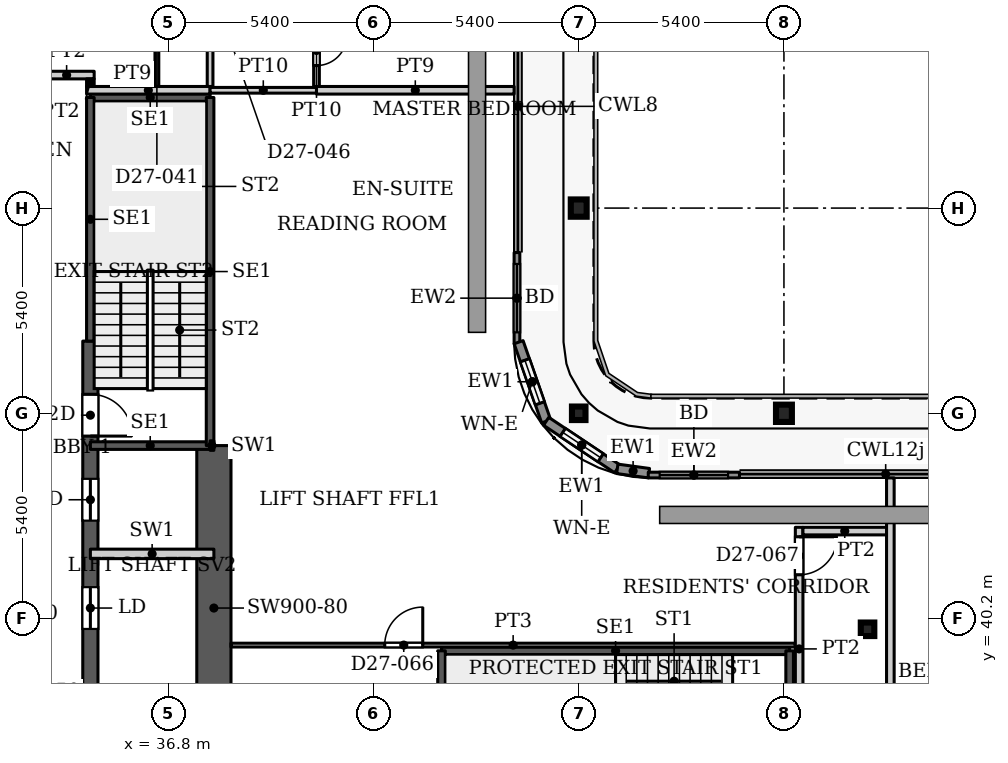
"""IFC4 building model, lengths in metres.
Left out: names, types, materials, properties, quantities, classifications, styles, units other than length and angle.
Written with IfcOpenShell. Run it as: python <this file> out.ifc"""

import sys

from ifc_helpers import new_model, si_unit, direction, frame, frame_2d, origin, origin_2d, place, context, subcontext, project, spatial, rectangle, hollow_rectangle, i_section, extrude, source, transform, mapped, element, fill, save


model = new_model("IFC4")
c1 = context("Model", 3, precision=1e-05, world=origin(), true_north=direction((0.0, 1.0)))
c2 = subcontext(c1, "Body", "Model", "MODEL_VIEW")
j1 = project(units=[si_unit("LENGTHUNIT", "METRE"), si_unit("PLANEANGLEUNIT", "RADIAN")], contexts=[c1])
p1 = place(None, origin())
s1 = spatial("IfcSite", under=j1, at=p1, CompositionType="ELEMENT")
p2 = place(p1, origin())
s2 = spatial("IfcBuilding", under=s1, at=p2, CompositionType="ELEMENT")
p3 = place(p2, frame((0.0, 0.0, 121.4)))
s3 = spatial("IfcBuildingStorey", under=s2, at=p3, CompositionType="ELEMENT", Elevation=121.4)
for number, where, z_axis, x_axis in (
    (1, (53.0, 45.6, 0.0), (0.0, 0.0, 1.0), (1.0, 0.0, 0.0)),
    (2, (47.6, 51.0, 0.0), (0.0, 0.0, 1.0), (1.0, 0.0, 0.0)),
):
    element("IfcColumn", number, at=place(p3, frame(where, z_axis=z_axis, x_axis=x_axis)), inside=s3, PredefinedType="COLUMN", context=c2, shape_type="SweptSolid", body=[
        extrude(i_section(OverallWidth=0.418, OverallDepth=0.455, WebThickness=0.042, FlangeThickness=0.068, FilletRadius=0.014, at=origin_2d()), origin(), (0.0, 0.0, 1.0), 3.9),
    ])
for number, where, z_axis, x_axis in (
    (3, (55.2, 39.916, 0.0), (0.0, 0.0, 1.0), (1.0, 0.0, 0.0)),
    (4, (47.6, 45.6, 0.0), (0.0, 0.0, 1.0), (1.0, 0.0, 0.0)),
):
    element("IfcColumn", number, at=place(p3, frame(where, z_axis=z_axis, x_axis=x_axis)), inside=s3, PredefinedType="COLUMN", context=c2, shape_type="SweptSolid", body=[
        extrude(hollow_rectangle(XDim=0.356, YDim=0.356, WallThickness=0.016, InnerFilletRadius=0.016, OuterFilletRadius=0.032, at=origin_2d()), origin(), (0.0, 0.0, 1.0), 3.9),
    ])
p4 = place(p3, frame((34.75, 29.05, 0.0), z_axis=(0.0, 0.0, 1.0), x_axis=(0.0, 1.0, 0.0)))
e5 = element("IfcWall", 5, at=p4, inside=s3, PredefinedType="SHEAR", context=c2, shape_type="SweptSolid", body=[
    extrude(rectangle(XDim=18.45, YDim=0.4, at=frame_2d((9.225, 0.0))), origin(), (0.0, 0.0, 1.0), 3.9),
])
p5 = place(p4, frame((8.025, 0.0, 0.0)))
e6 = element("IfcOpeningElement", 6, at=p5, cuts=e5, PredefinedType="OPENING", context=c2, shape_type="SweptSolid", body=[
    extrude(rectangle(XDim=1.1, YDim=2.2, at=frame_2d((0.55, 1.1))), frame((0.0, 0.21, 0.0), z_axis=(0.0, -1.0, 0.0), x_axis=(1.0, 0.0, 0.0)), (0.0, 0.0, 1.0), 0.42),
])
p6 = place(p4, frame((10.875, 0.0, 0.0)))
e7 = element("IfcOpeningElement", 7, at=p6, cuts=e5, PredefinedType="OPENING", context=c2, shape_type="SweptSolid", body=[
    extrude(rectangle(XDim=1.1, YDim=2.2, at=frame_2d((0.55, 1.1))), frame((0.0, 0.21, 0.0), z_axis=(0.0, -1.0, 0.0), x_axis=(1.0, 0.0, 0.0)), (0.0, 0.0, 1.0), 0.42),
])
p7 = place(p4, frame((13.725, 0.0, 0.0)))
e8 = element("IfcOpeningElement", 8, at=p7, cuts=e5, PredefinedType="OPENING", context=c2, shape_type="SweptSolid", body=[
    extrude(rectangle(XDim=1.1, YDim=2.2, at=frame_2d((0.55, 1.1))), frame((0.0, 0.21, 0.0), z_axis=(0.0, -1.0, 0.0), x_axis=(1.0, 0.0, 0.0)), (0.0, 0.0, 1.0), 0.42),
])
p8 = place(p4, frame((15.95, 0.0, 0.0)))
e9 = element("IfcOpeningElement", 9, at=p8, cuts=e5, PredefinedType="OPENING", context=c2, shape_type="SweptSolid", body=[
    extrude(rectangle(XDim=1.1, YDim=2.2, at=frame_2d((0.55, 1.1))), frame((0.0, 0.21, 0.0), z_axis=(0.0, -1.0, 0.0), x_axis=(1.0, 0.0, 0.0)), (0.0, 0.0, 1.0), 0.42),
])
p9 = place(p3, frame((38.0, 36.2, 0.0), z_axis=(0.0, 0.0, 1.0), x_axis=(0.0, 1.0, 0.0)))
e10 = element("IfcWall", 10, at=p9, inside=s3, PredefinedType="SHEAR", context=c2, shape_type="SweptSolid", body=[
    extrude(rectangle(XDim=8.55, YDim=0.9, at=frame_2d((4.275, 0.0))), origin(), (0.0, 0.0, 1.0), 3.9),
])
p10 = place(p3, frame((45.975, 49.83, 0.0), z_axis=(0.0, 0.0, 1.0), x_axis=(0.0, -1.0, 0.0)))
e11 = element("IfcWall", 11, at=p10, inside=s3, PredefinedType="SOLIDWALL", context=c2, shape_type="SweptSolid", body=[
    extrude(rectangle(XDim=2.4, YDim=0.15, at=frame_2d((1.2, 0.0))), origin(), (0.0, 0.0, 1.0), 3.75),
])
p11 = place(p10, frame((0.3, 0.0, 0.0)))
e12 = element("IfcOpeningElement", 12, at=p11, cuts=e11, PredefinedType="OPENING", context=c2, shape_type="SweptSolid", body=[
    extrude(rectangle(XDim=1.8, YDim=2.4, at=frame_2d((0.9, 1.2))), frame((0.0, 0.085, 0.0), z_axis=(0.0, -1.0, 0.0), x_axis=(1.0, 0.0, 0.0)), (0.0, 0.0, 1.0), 0.17),
])
p12 = place(p3, frame((46.018, 47.471, 0.0), z_axis=(0.0, 0.0, 1.0), x_axis=(0.328791208903, -0.944402637093, 0.0)))
e13 = element("IfcWall", 13, at=p12, inside=s3, PredefinedType="SOLIDWALL", context=c2, shape_type="SweptSolid", body=[
    extrude(rectangle(XDim=2.205, YDim=0.25, at=frame_2d((1.102, 0.0))), origin(), (0.0, 0.0, 1.0), 3.75),
])
p13 = place(p12, frame((0.503, 0.0, 0.6)))
e14 = element("IfcOpeningElement", 14, at=p13, cuts=e13, PredefinedType="OPENING", context=c2, shape_type="SweptSolid", body=[
    extrude(rectangle(XDim=1.2, YDim=2.1, at=frame_2d((0.6, 1.05))), frame((0.0, 0.135, 0.0), z_axis=(0.0, -1.0, 0.0), x_axis=(1.0, 0.0, 0.0)), (0.0, 0.0, 1.0), 0.27),
])
p14 = place(p3, frame((46.743, 45.389, 0.0), z_axis=(0.0, 0.0, 1.0), x_axis=(0.831449265529, -0.555600682912, 0.0)))
e15 = element("IfcWall", 15, at=p14, inside=s3, PredefinedType="SOLIDWALL", context=c2, shape_type="SweptSolid", body=[
    extrude(rectangle(XDim=2.251, YDim=0.25, at=frame_2d((1.126, 0.0))), origin(), (0.0, 0.0, 1.0), 3.75),
])
p15 = place(p14, frame((0.525, 0.0, 0.6)))
e16 = element("IfcOpeningElement", 16, at=p15, cuts=e15, PredefinedType="OPENING", context=c2, shape_type="SweptSolid", body=[
    extrude(rectangle(XDim=1.2, YDim=2.1, at=frame_2d((0.6, 1.05))), frame((0.0, 0.135, 0.0), z_axis=(0.0, -1.0, 0.0), x_axis=(1.0, 0.0, 0.0)), (0.0, 0.0, 1.0), 0.27),
])
p16 = place(p3, frame((48.615, 44.138, 0.0), z_axis=(0.0, 0.0, 1.0), x_axis=(0.990741504246, -0.135761819977, 0.0)))
e17 = element("IfcWall", 17, at=p16, inside=s3, PredefinedType="SOLIDWALL", context=c2, shape_type="SweptSolid", body=[
    extrude(rectangle(XDim=0.84, YDim=0.25, at=frame_2d((0.42, 0.0))), origin(), (0.0, 0.0, 1.0), 3.75),
])
p17 = place(p3, frame((49.43, 43.975, 0.0), z_axis=(0.0, 0.0, 1.0), x_axis=(1.0, 0.0, 0.0)))
e18 = element("IfcWall", 18, at=p17, inside=s3, PredefinedType="SOLIDWALL", context=c2, shape_type="SweptSolid", body=[
    extrude(rectangle(XDim=2.4, YDim=0.15, at=frame_2d((1.2, 0.0))), origin(), (0.0, 0.0, 1.0), 3.75),
])
p18 = place(p17, frame((0.3, 0.0, 0.0)))
e19 = element("IfcOpeningElement", 19, at=p18, cuts=e18, PredefinedType="OPENING", context=c2, shape_type="SweptSolid", body=[
    extrude(rectangle(XDim=1.8, YDim=2.4, at=frame_2d((0.9, 1.2))), frame((0.0, 0.085, 0.0), z_axis=(0.0, -1.0, 0.0), x_axis=(1.0, 0.0, 0.0)), (0.0, 0.0, 1.0), 0.17),
])
p19 = place(p3, frame((43.99, 39.35, 0.0), z_axis=(0.0, 0.0, 1.0), x_axis=(1.0, 0.0, 0.0)))
e20 = element("IfcWall", 20, at=p19, inside=s3, PredefinedType="SHEAR", context=c2, shape_type="SweptSolid", body=[
    extrude(rectangle(XDim=9.16, YDim=0.2, at=frame_2d((4.58, 0.0))), origin(), (0.0, 0.0, 1.0), 3.9),
])
for number, where, z_axis, x_axis in (
    (21, (43.99, 36.2, 0.0), (0.0, 0.0, 1.0), (0.0, 1.0, 0.0)),
    (22, (53.15, 36.2, 0.0), (0.0, 0.0, 1.0), (0.0, 1.0, 0.0)),
):
    element("IfcWall", number, at=place(p3, frame(where, z_axis=z_axis, x_axis=x_axis)), inside=s3, PredefinedType="SHEAR", context=c2, shape_type="SweptSolid", body=[
        extrude(rectangle(XDim=3.15, YDim=0.2, at=frame_2d((1.575, 0.0))), origin(), (0.0, 0.0, 1.0), 3.9),
    ])
for number, where, z_axis, x_axis in (
    (23, (34.75, 44.75, 0.0), (0.0, 0.0, 1.0), (1.0, 0.0, 0.0)),
    (24, (34.75, 53.91, 0.0), (0.0, 0.0, 1.0), (1.0, 0.0, 0.0)),
):
    element("IfcWall", number, at=place(p3, frame(where, z_axis=z_axis, x_axis=x_axis)), inside=s3, PredefinedType="SHEAR", context=c2, shape_type="SweptSolid", body=[
        extrude(rectangle(XDim=3.15, YDim=0.2, at=frame_2d((1.575, 0.0))), origin(), (0.0, 0.0, 1.0), 3.9),
    ])
p20 = place(p3, frame((34.75, 47.5, 0.0), z_axis=(0.0, 0.0, 1.0), x_axis=(0.0, 1.0, 0.0)))
e25 = element("IfcWall", 25, at=p20, inside=s3, PredefinedType="SHEAR", context=c2, shape_type="SweptSolid", body=[
    extrude(rectangle(XDim=6.41, YDim=0.2, at=frame_2d((3.205, 0.0))), origin(), (0.0, 0.0, 1.0), 3.9),
])
p21 = place(p3, frame((37.9, 44.75, 0.0), z_axis=(0.0, 0.0, 1.0), x_axis=(0.0, 1.0, 0.0)))
e26 = element("IfcWall", 26, at=p21, inside=s3, PredefinedType="SHEAR", context=c2, shape_type="SweptSolid", body=[
    extrude(rectangle(XDim=9.16, YDim=0.2, at=frame_2d((4.58, 0.0))), origin(), (0.0, 0.0, 1.0), 3.9),
])
p22 = place(p3, frame((34.75, 41.9, 0.0), z_axis=(0.0, 0.0, 1.0), x_axis=(1.0, 0.0, 0.0)))
e27 = element("IfcWall", 27, at=p22, inside=s3, PredefinedType="PARTITIONING", context=c2, shape_type="SweptSolid", body=[
    extrude(rectangle(XDim=3.25, YDim=0.25, at=frame_2d((1.625, 0.0))), origin(), (0.0, 0.0, 1.0), 3.9),
])
p23 = place(p3, frame((37.9, 44.75, 0.0), z_axis=(0.0, 0.0, 1.0), x_axis=(1.0, 0.0, 0.0)))
e28 = element("IfcWall", 28, at=p23, inside=s3, PredefinedType="PARTITIONING", context=c2, shape_type="SweptSolid", body=[
    extrude(rectangle(XDim=0.1, YDim=0.25, at=frame_2d((0.05, 0.0))), origin(), (0.0, 0.0, 1.0), 3.9),
])
p24 = place(p3, frame((33.4, 54.5, 0.0), z_axis=(0.0, 0.0, 1.0), x_axis=(1.0, 0.0, 0.0)))
e29 = element("IfcWall", 29, at=p24, inside=s3, PredefinedType="PARTITIONING", context=c2, shape_type="SweptSolid", body=[
    extrude(rectangle(XDim=1.45, YDim=0.2, at=frame_2d((0.725, 0.0))), origin(), (0.0, 0.0, 1.0), 3.6),
])
p25 = place(p3, frame((34.65, 54.1, 0.0), z_axis=(0.0, 0.0, 1.0), x_axis=(1.0, 0.0, 0.0)))
e30 = element("IfcWall", 30, at=p25, inside=s3, PredefinedType="PARTITIONING", context=c2, shape_type="SweptSolid", body=[
    extrude(rectangle(XDim=3.25, YDim=0.2, at=frame_2d((1.625, 0.0))), origin(), (0.0, 0.0, 1.0), 3.6),
])
p26 = place(p3, frame((34.75, 54.2, 0.0), z_axis=(0.0, 0.0, 1.0), x_axis=(0.0, 1.0, 0.0)))
e31 = element("IfcWall", 31, at=p26, inside=s3, PredefinedType="PARTITIONING", context=c2, shape_type="SweptSolid", body=[
    extrude(rectangle(XDim=0.2, YDim=0.2, at=frame_2d((0.1, 0.0))), origin(), (0.0, 0.0, 1.0), 3.6),
])
p27 = place(p3, frame((36.5, 54.2, 0.0), z_axis=(0.0, 0.0, 1.0), x_axis=(0.0, 1.0, 0.0)))
e32 = element("IfcWall", 32, at=p27, inside=s3, PredefinedType="PARTITIONING", context=c2, shape_type="SweptSolid", body=[
    extrude(rectangle(XDim=2.85, YDim=0.1, at=frame_2d((1.425, 0.0))), origin(), (0.0, 0.0, 1.0), 3.6),
])
p28 = place(p27, frame((0.95, 0.0, 0.0)))
e33 = element("IfcOpeningElement", 33, at=p28, cuts=e32, PredefinedType="OPENING", context=c2, shape_type="SweptSolid", body=[
    extrude(rectangle(XDim=0.9, YDim=2.1, at=frame_2d((0.45, 1.05))), frame((0.0, 0.06, 0.0), z_axis=(0.0, -1.0, 0.0), x_axis=(1.0, 0.0, 0.0)), (0.0, 0.0, 1.0), 0.12),
])
p29 = place(p3, frame((37.9, 54.1, 0.0), z_axis=(0.0, 0.0, 1.0), x_axis=(1.0, 0.0, 0.0)))
e34 = element("IfcWall", 34, at=p29, inside=s3, PredefinedType="PARTITIONING", context=c2, shape_type="SweptSolid", body=[
    extrude(rectangle(XDim=2.8, YDim=0.15, at=frame_2d((1.4, 0.0))), origin(), (0.0, 0.0, 1.0), 3.6),
])
p30 = place(p3, frame((37.9, 54.2, 0.0), z_axis=(0.0, 0.0, 1.0), x_axis=(0.0, 1.0, 0.0)))
e35 = element("IfcWall", 35, at=p30, inside=s3, PredefinedType="PARTITIONING", context=c2, shape_type="SweptSolid", body=[
    extrude(rectangle(XDim=14.2, YDim=0.15, at=frame_2d((7.1, 0.0))), origin(), (0.0, 0.0, 1.0), 3.6),
])
p31 = place(p30, frame((4.4, 0.0, 0.0)))
e36 = element("IfcOpeningElement", 36, at=p31, cuts=e35, PredefinedType="OPENING", context=c2, shape_type="SweptSolid", body=[
    extrude(rectangle(XDim=0.9, YDim=2.1, at=frame_2d((0.45, 1.05))), frame((0.0, 0.085, 0.0), z_axis=(0.0, -1.0, 0.0), x_axis=(1.0, 0.0, 0.0)), (0.0, 0.0, 1.0), 0.17),
])
p32 = place(p30, frame((9.5, 0.0, 0.0)))
e37 = element("IfcOpeningElement", 37, at=p32, cuts=e35, PredefinedType="OPENING", context=c2, shape_type="SweptSolid", body=[
    extrude(rectangle(XDim=0.9, YDim=2.1, at=frame_2d((0.45, 1.05))), frame((0.0, 0.085, 0.0), z_axis=(0.0, -1.0, 0.0), x_axis=(1.0, 0.0, 0.0)), (0.0, 0.0, 1.0), 0.17),
])
p33 = place(p30, frame((12.3, 0.0, 0.0)))
e38 = element("IfcOpeningElement", 38, at=p33, cuts=e35, PredefinedType="OPENING", context=c2, shape_type="SweptSolid", body=[
    extrude(rectangle(XDim=1.0, YDim=2.1, at=frame_2d((0.5, 1.05))), frame((0.0, 0.085, 0.0), z_axis=(0.0, -1.0, 0.0), x_axis=(1.0, 0.0, 0.0)), (0.0, 0.0, 1.0), 0.17),
])
p34 = place(p30, frame((6.95, 0.0, 0.0)))
e39 = element("IfcOpeningElement", 39, at=p34, cuts=e35, PredefinedType="OPENING", context=c2, shape_type="SweptSolid", body=[
    extrude(rectangle(XDim=0.9, YDim=2.1, at=frame_2d((0.45, 1.05))), frame((0.0, 0.085, 0.0), z_axis=(0.0, -1.0, 0.0), x_axis=(1.0, 0.0, 0.0)), (0.0, 0.0, 1.0), 0.17),
])
p35 = place(p30, frame((2.3, 0.0, 0.0)))
e40 = element("IfcOpeningElement", 40, at=p35, cuts=e35, PredefinedType="OPENING", context=c2, shape_type="SweptSolid", body=[
    extrude(rectangle(XDim=0.9, YDim=2.1, at=frame_2d((0.45, 1.05))), frame((0.0, 0.085, 0.0), z_axis=(0.0, -1.0, 0.0), x_axis=(1.0, 0.0, 0.0)), (0.0, 0.0, 1.0), 0.17),
])
p36 = place(p3, frame((38.449, 39.5, 0.0), z_axis=(0.0, 0.0, 1.0), x_axis=(1.0, 0.0, 0.0)))
e41 = element("IfcWall", 41, at=p36, inside=s3, PredefinedType="PARTITIONING", context=c2, shape_type="SweptSolid", body=[
    extrude(rectangle(XDim=14.851, YDim=0.1, at=frame_2d((7.426, 0.0))), origin(), (0.0, 0.0, 1.0), 3.6),
])
p37 = place(p36, frame((4.047, 0.0, 0.0)))
e42 = element("IfcOpeningElement", 42, at=p37, cuts=e41, PredefinedType="OPENING", context=c2, shape_type="SweptSolid", body=[
    extrude(rectangle(XDim=1.0, YDim=2.1, at=frame_2d((0.5, 1.05))), frame((0.0, 0.06, 0.0), z_axis=(0.0, -1.0, 0.0), x_axis=(1.0, 0.0, 0.0)), (0.0, 0.0, 1.0), 0.12),
])
p38 = place(p3, frame((40.7, 54.1, 0.0), z_axis=(0.0, 0.0, 1.0), x_axis=(1.0, 0.0, 0.0)))
e43 = element("IfcWall", 43, at=p38, inside=s3, PredefinedType="PARTITIONING", context=c2, shape_type="SweptSolid", body=[
    extrude(rectangle(XDim=5.2, YDim=0.2, at=frame_2d((2.6, 0.0))), origin(), (0.0, 0.0, 1.0), 3.6),
])
p39 = place(p3, frame((40.7, 54.2, 0.0), z_axis=(0.0, 0.0, 1.0), x_axis=(0.0, 1.0, 0.0)))
e44 = element("IfcWall", 44, at=p39, inside=s3, PredefinedType="PARTITIONING", context=c2, shape_type="SweptSolid", body=[
    extrude(rectangle(XDim=1.925, YDim=0.15, at=frame_2d((0.962, 0.0))), origin(), (0.0, 0.0, 1.0), 3.6),
])
p40 = place(p39, frame((0.55, 0.0, 0.0)))
e45 = element("IfcOpeningElement", 45, at=p40, cuts=e44, PredefinedType="OPENING", context=c2, shape_type="SweptSolid", body=[
    extrude(rectangle(XDim=0.8, YDim=2.1, at=frame_2d((0.4, 1.05))), frame((0.0, 0.085, 0.0), z_axis=(0.0, -1.0, 0.0), x_axis=(1.0, 0.0, 0.0)), (0.0, 0.0, 1.0), 0.17),
])
p41 = place(p3, frame((53.4, 36.199, 0.0), z_axis=(0.0, 0.0, 1.0), x_axis=(0.0, 1.0, 0.0)))
e46 = element("IfcWall", 46, at=p41, inside=s3, PredefinedType="PARTITIONING", context=c2, shape_type="SweptSolid", body=[
    extrude(rectangle(XDim=6.401, YDim=0.2, at=frame_2d((3.201, 0.0))), origin(), (0.0, 0.0, 1.0), 3.6),
])
p42 = place(p41, frame((5.151, 0.0, 0.0)))
e47 = element("IfcOpeningElement", 47, at=p42, cuts=e46, PredefinedType="OPENING", context=c2, shape_type="SweptSolid", body=[
    extrude(rectangle(XDim=1.0, YDim=2.1, at=frame_2d((0.5, 1.05))), frame((0.0, 0.11, 0.0), z_axis=(0.0, -1.0, 0.0), x_axis=(1.0, 0.0, 0.0)), (0.0, 0.0, 1.0), 0.22),
])
p43 = place(p3, frame((53.5, 42.5, 0.0), z_axis=(0.0, 0.0, 1.0), x_axis=(1.0, 0.0, 0.0)))
e48 = element("IfcWall", 48, at=p43, inside=s3, PredefinedType="PARTITIONING", context=c2, shape_type="SweptSolid", body=[
    extrude(rectangle(XDim=2.2, YDim=0.2, at=frame_2d((1.1, 0.0))), origin(), (0.0, 0.0, 1.0), 3.6),
])
p44 = place(p3, frame((55.8, 30.4, 0.0), z_axis=(0.0, 0.0, 1.0), x_axis=(0.0, 1.0, 0.0)))
e49 = element("IfcWall", 49, at=p44, inside=s3, PredefinedType="PARTITIONING", context=c2, shape_type="SweptSolid", body=[
    extrude(rectangle(XDim=13.5, YDim=0.2, at=frame_2d((6.75, 0.0))), origin(), (0.0, 0.0, 1.0), 3.6),
])
m1 = source(origin(), c2, "Body", "SweptSolid", [
    extrude(rectangle(XDim=1.8, YDim=2.4, at=frame_2d((0.9, 1.2))), frame((0.0, 0.025, 0.0), z_axis=(0.0, -1.0, 0.0), x_axis=(1.0, 0.0, 0.0)), (0.0, 0.0, 1.0), 0.05),
])
p45 = place(p11, origin())
e50 = element("IfcDoor", 50, at=p45, inside=s3, OperationType="SLIDING_TO_LEFT", PredefinedType="DOOR", context=c2, shape_type="MappedRepresentation", body=[
    mapped(m1, transform((0.0, 0.0, 0.0), x_axis=(1.0, 0.0, 0.0), y_axis=(0.0, 1.0, 0.0), z_axis=(0.0, 0.0, 1.0), scale=1.0)),
])
fill(e12, e50)
m2 = source(origin(), c2, "Body", "SweptSolid", [
    extrude(rectangle(XDim=1.2, YDim=2.1, at=frame_2d((0.6, 1.05))), frame((0.0, 0.03, 0.0), z_axis=(0.0, -1.0, 0.0), x_axis=(1.0, 0.0, 0.0)), (0.0, 0.0, 1.0), 0.06),
])
p46 = place(p13, origin())
e51 = element("IfcWindow", 51, at=p46, inside=s3, PartitioningType="SINGLE_PANEL", PredefinedType="WINDOW", context=c2, shape_type="MappedRepresentation", body=[
    mapped(m2, transform((0.0, 0.0, 0.0), x_axis=(1.0, 0.0, 0.0), y_axis=(0.0, 1.0, 0.0), z_axis=(0.0, 0.0, 1.0), scale=1.0)),
])
fill(e14, e51)
p47 = place(p15, origin())
e52 = element("IfcWindow", 52, at=p47, inside=s3, PartitioningType="SINGLE_PANEL", PredefinedType="WINDOW", context=c2, shape_type="MappedRepresentation", body=[
    mapped(m2, transform((0.0, 0.0, 0.0), x_axis=(1.0, 0.0, 0.0), y_axis=(0.0, 1.0, 0.0), z_axis=(0.0, 0.0, 1.0), scale=1.0)),
])
fill(e16, e52)
p48 = place(p18, origin())
e53 = element("IfcDoor", 53, at=p48, inside=s3, OperationType="SLIDING_TO_LEFT", PredefinedType="DOOR", context=c2, shape_type="MappedRepresentation", body=[
    mapped(m1, transform((0.0, 0.0, 0.0), x_axis=(1.0, 0.0, 0.0), y_axis=(0.0, 1.0, 0.0), z_axis=(0.0, 0.0, 1.0), scale=1.0)),
])
fill(e19, e53)
m3 = source(origin(), c2, "Body", "SweptSolid", [
    extrude(rectangle(XDim=1.1, YDim=2.2, at=frame_2d((0.55, 1.1))), frame((0.0, 0.025, 0.0), z_axis=(0.0, -1.0, 0.0), x_axis=(1.0, 0.0, 0.0)), (0.0, 0.0, 1.0), 0.05),
])
p49 = place(p6, origin())
e54 = element("IfcDoor", 54, at=p49, inside=s3, OperationType="SLIDING_TO_LEFT", PredefinedType="DOOR", context=c2, shape_type="MappedRepresentation", body=[
    mapped(m3, transform((0.0, 0.0, 0.0), x_axis=(1.0, 0.0, 0.0), y_axis=(0.0, 1.0, 0.0), z_axis=(0.0, 0.0, 1.0), scale=1.0)),
])
fill(e7, e54)
p50 = place(p7, origin())
e55 = element("IfcDoor", 55, at=p50, inside=s3, OperationType="SLIDING_TO_LEFT", PredefinedType="DOOR", context=c2, shape_type="MappedRepresentation", body=[
    mapped(m3, transform((0.0, 0.0, 0.0), x_axis=(1.0, 0.0, 0.0), y_axis=(0.0, 1.0, 0.0), z_axis=(0.0, 0.0, 1.0), scale=1.0)),
])
fill(e8, e55)
m4 = source(origin(), c2, "Body", "SweptSolid", [
    extrude(rectangle(XDim=1.1, YDim=2.2, at=frame_2d((0.55, 1.1))), frame((0.0, 0.025, 0.0), z_axis=(0.0, -1.0, 0.0), x_axis=(1.0, 0.0, 0.0)), (0.0, 0.0, 1.0), 0.05),
])
p51 = place(p8, origin())
e56 = element("IfcDoor", 56, at=p51, inside=s3, OperationType="SINGLE_SWING_RIGHT", PredefinedType="DOOR", context=c2, shape_type="MappedRepresentation", body=[
    mapped(m4, transform((0.0, 0.0, 0.0), x_axis=(1.0, 0.0, 0.0), y_axis=(0.0, 1.0, 0.0), z_axis=(0.0, 0.0, 1.0), scale=1.0)),
])
fill(e9, e56)
m5 = source(origin(), c2, "Body", "SweptSolid", [
    extrude(rectangle(XDim=0.8, YDim=2.1, at=frame_2d((0.4, 1.05))), frame((0.0, 0.025, 0.0), z_axis=(0.0, -1.0, 0.0), x_axis=(1.0, 0.0, 0.0)), (0.0, 0.0, 1.0), 0.05),
])
p52 = place(p40, origin())
e57 = element("IfcDoor", 57, at=p52, inside=s3, OperationType="SINGLE_SWING_RIGHT", PredefinedType="DOOR", context=c2, shape_type="MappedRepresentation", body=[
    mapped(m5, transform((0.0, 0.0, 0.0), x_axis=(1.0, 0.0, 0.0), y_axis=(0.0, 1.0, 0.0), z_axis=(0.0, 0.0, 1.0), scale=1.0)),
])
fill(e45, e57)
m6 = source(origin(), c2, "Body", "SweptSolid", [
    extrude(rectangle(XDim=1.0, YDim=2.1, at=frame_2d((0.5, 1.05))), frame((0.0, 0.025, 0.0), z_axis=(0.0, -1.0, 0.0), x_axis=(1.0, 0.0, 0.0)), (0.0, 0.0, 1.0), 0.05),
])
p53 = place(p37, origin())
e58 = element("IfcDoor", 58, at=p53, inside=s3, OperationType="SINGLE_SWING_LEFT", PredefinedType="DOOR", context=c2, shape_type="MappedRepresentation", body=[
    mapped(m6, transform((0.0, 0.0, 0.0), x_axis=(1.0, 0.0, 0.0), y_axis=(0.0, 1.0, 0.0), z_axis=(0.0, 0.0, 1.0), scale=1.0)),
])
fill(e42, e58)
m7 = source(origin(), c2, "Body", "SweptSolid", [
    extrude(rectangle(XDim=1.0, YDim=2.1, at=frame_2d((0.5, 1.05))), frame((0.0, 0.025, 0.0), z_axis=(0.0, -1.0, 0.0), x_axis=(1.0, 0.0, 0.0)), (0.0, 0.0, 1.0), 0.05),
])
p54 = place(p42, origin())
e59 = element("IfcDoor", 59, at=p54, inside=s3, OperationType="SINGLE_SWING_RIGHT", PredefinedType="DOOR", context=c2, shape_type="MappedRepresentation", body=[
    mapped(m7, transform((0.0, 0.0, 0.0), x_axis=(1.0, 0.0, 0.0), y_axis=(0.0, 1.0, 0.0), z_axis=(0.0, 0.0, 1.0), scale=1.0)),
])
fill(e47, e59)
save(model, sys.argv[1])
